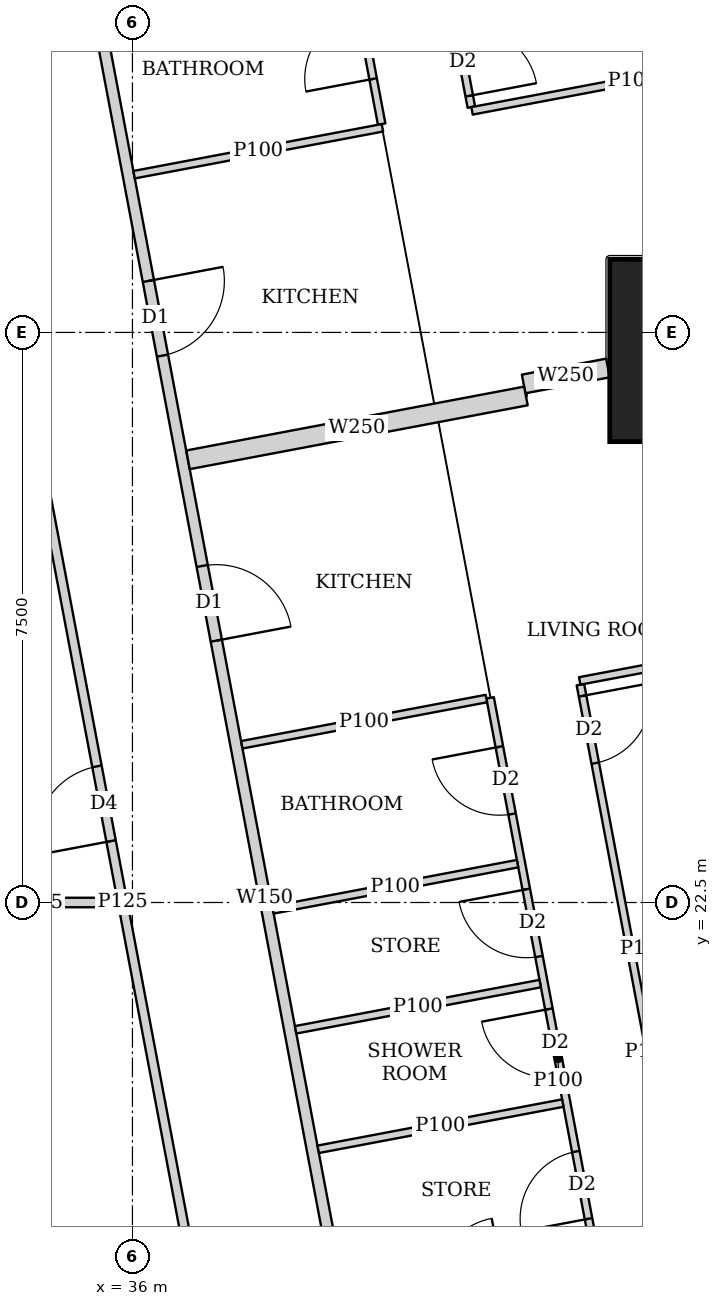
"""IFC4 building model, lengths in metres.
Left out: names, types, materials, properties, quantities, classifications, styles, units other than length and angle.
Written with IfcOpenShell. Run it as: python <this file> out.ifc"""

import sys

from ifc_helpers import new_model, si_unit, direction, frame, frame_2d, origin, origin_2d, place, context, subcontext, project, spatial, rectangle, extrude, element, fill, save


model = new_model("IFC4")
c1 = context("Model", 3, precision=1e-05, world=origin(), true_north=direction((0.0, 1.0)))
c2 = subcontext(c1, "Body", "Model", "MODEL_VIEW")
j1 = project(units=[si_unit("LENGTHUNIT", "METRE"), si_unit("PLANEANGLEUNIT", "RADIAN")], contexts=[c1])
p1 = place(None, origin())
s1 = spatial("IfcSite", under=j1, at=p1, CompositionType="ELEMENT")
p2 = place(p1, origin())
s2 = spatial("IfcBuilding", under=s1, at=p2, CompositionType="ELEMENT")
p3 = place(p2, frame((0.0, 0.0, 242.45)))
s3 = spatial("IfcBuildingStorey", under=s2, at=p3, CompositionType="ELEMENT", Elevation=242.45)
p4 = place(p3, frame((43.48, 29.763, 0.0), z_axis=(0.0, 0.0, 1.0), x_axis=(1.0, 0.0, 0.0)))
e1 = element("IfcColumn", 1, at=p4, inside=s3, PredefinedType="COLUMN", context=c2, shape_type="SweptSolid", body=[
    extrude(rectangle(XDim=2.4, YDim=2.4, at=origin_2d()), origin(), (0.0, 0.0, 1.0), 3.75),
])
p5 = place(p3, frame((33.933, 42.73, 0.0), z_axis=(0.0, 0.0, 1.0), x_axis=(0.185595417643, -0.982626246825, 0.0)))
e2 = element("IfcWall", 2, at=p5, inside=s3, PredefinedType="SOLIDWALL", context=c2, shape_type="SweptSolid", body=[
    extrude(rectangle(XDim=41.051, YDim=0.15, at=frame_2d((20.525, 0.0))), origin(), (0.0, 0.0, 1.0), 2.45),
])
p6 = place(p5, frame((12.266, 0.0, 0.0)))
e3 = element("IfcOpeningElement", 3, at=p6, cuts=e2, PredefinedType="OPENING", context=c2, shape_type="SweptSolid", body=[
    extrude(rectangle(XDim=1.0, YDim=2.1, at=frame_2d((0.5, 1.05))), frame((0.0, 0.085, 0.0), z_axis=(0.0, -1.0, 0.0), x_axis=(1.0, 0.0, 0.0)), (0.0, 0.0, 1.0), 0.17),
])
p7 = place(p5, frame((16.082, 0.0, 0.0)))
e4 = element("IfcOpeningElement", 4, at=p7, cuts=e2, PredefinedType="OPENING", context=c2, shape_type="SweptSolid", body=[
    extrude(rectangle(XDim=1.0, YDim=2.1, at=frame_2d((0.5, 1.05))), frame((0.0, 0.085, 0.0), z_axis=(0.0, -1.0, 0.0), x_axis=(1.0, 0.0, 0.0)), (0.0, 0.0, 1.0), 0.17),
])
p8 = place(p5, frame((30.862, 0.0, 0.0)))
e5 = element("IfcOpeningElement", 5, at=p8, cuts=e2, PredefinedType="OPENING", context=c2, shape_type="SweptSolid", body=[
    extrude(rectangle(XDim=1.0, YDim=2.1, at=frame_2d((0.5, 1.05))), frame((0.0, 0.085, 0.0), z_axis=(0.0, -1.0, 0.0), x_axis=(1.0, 0.0, 0.0)), (0.0, 0.0, 1.0), 0.17),
])
p9 = place(p3, frame((38.764, 41.941, 0.0), z_axis=(0.0, 0.0, 1.0), x_axis=(0.185548572312, -0.982635093671, 0.0)))
e6 = element("IfcWall", 6, at=p9, inside=s3, PredefinedType="PARTITIONING", context=c2, shape_type="SweptSolid", body=[
    extrude(rectangle(XDim=9.135, YDim=0.1, at=frame_2d((4.568, 0.0))), origin(), (0.0, 0.0, 1.0), 3.45),
])
p10 = place(p9, frame((8.085, 0.0, 0.0)))
e7 = element("IfcOpeningElement", 7, at=p10, cuts=e6, PredefinedType="OPENING", context=c2, shape_type="SweptSolid", body=[
    extrude(rectangle(XDim=0.9, YDim=2.1, at=frame_2d((0.45, 1.05))), frame((0.0, 0.06, 0.0), z_axis=(0.0, -1.0, 0.0), x_axis=(1.0, 0.0, 0.0)), (0.0, 0.0, 1.0), 0.12),
])
p11 = place(p9, frame((3.7, 0.0, 0.0)))
e8 = element("IfcOpeningElement", 8, at=p11, cuts=e6, PredefinedType="OPENING", context=c2, shape_type="SweptSolid", body=[
    extrude(rectangle(XDim=0.9, YDim=2.1, at=frame_2d((0.45, 1.05))), frame((0.0, 0.06, 0.0), z_axis=(0.0, -1.0, 0.0), x_axis=(1.0, 0.0, 0.0)), (0.0, 0.0, 1.0), 0.12),
])
p12 = place(p3, frame((37.473, 42.309, 0.0), z_axis=(0.0, 0.0, 1.0), x_axis=(0.185491912953, -0.982645790827, 0.0)))
e9 = element("IfcWall", 9, at=p12, inside=s3, PredefinedType="PARTITIONING", context=c2, shape_type="SweptSolid", body=[
    extrude(rectangle(XDim=9.737, YDim=0.1, at=frame_2d((4.869, 0.0))), origin(), (0.0, 0.0, 1.0), 3.45),
])
p13 = place(p12, frame((8.232, 0.0, 0.0)))
e10 = element("IfcOpeningElement", 10, at=p13, cuts=e9, PredefinedType="OPENING", context=c2, shape_type="SweptSolid", body=[
    extrude(rectangle(XDim=0.9, YDim=2.1, at=frame_2d((0.45, 1.05))), frame((0.0, 0.06, 0.0), z_axis=(0.0, -1.0, 0.0), x_axis=(1.0, 0.0, 0.0)), (0.0, 0.0, 1.0), 0.12),
])
p14 = place(p12, frame((2.853, 0.0, 0.0)))
e11 = element("IfcOpeningElement", 11, at=p14, cuts=e9, PredefinedType="OPENING", context=c2, shape_type="SweptSolid", body=[
    extrude(rectangle(XDim=0.9, YDim=2.1, at=frame_2d((0.45, 1.05))), frame((0.0, 0.06, 0.0), z_axis=(0.0, -1.0, 0.0), x_axis=(1.0, 0.0, 0.0)), (0.0, 0.0, 1.0), 0.12),
])
p15 = place(p12, frame((5.564, 0.0, 0.0)))
e12 = element("IfcOpeningElement", 12, at=p15, cuts=e9, PredefinedType="OPENING", context=c2, shape_type="SweptSolid", body=[
    extrude(rectangle(XDim=0.9, YDim=2.1, at=frame_2d((0.45, 1.05))), frame((0.0, 0.06, 0.0), z_axis=(0.0, -1.0, 0.0), x_axis=(1.0, 0.0, 0.0)), (0.0, 0.0, 1.0), 0.12),
])
p16 = place(p3, frame((44.693, 33.713, 0.0), z_axis=(0.0, 0.0, 1.0), x_axis=(-0.982633535512, -0.185556823879, 0.0)))
e13 = element("IfcWall", 13, at=p16, inside=s3, PredefinedType="PARTITIONING", context=c2, shape_type="SweptSolid", body=[
    extrude(rectangle(XDim=4.3, YDim=0.1, at=frame_2d((2.15, 0.0))), origin(), (0.0, 0.0, 1.0), 2.0),
])
p17 = place(p3, frame((39.289, 32.692, 0.0), z_axis=(0.0, 0.0, 1.0), x_axis=(-0.982633623707, -0.185556356831, 0.0)))
e14 = element("IfcWall", 14, at=p17, inside=s3, PredefinedType="PARTITIONING", context=c2, shape_type="SweptSolid", body=[
    extrude(rectangle(XDim=3.325, YDim=0.1, at=frame_2d((1.663, 0.0))), origin(), (0.0, 0.0, 1.0), 3.45),
])
p18 = place(p3, frame((41.894, 25.366, 0.0), z_axis=(0.0, 0.0, 1.0), x_axis=(0.185612905165, -0.982622943675, 0.0)))
e15 = element("IfcWall", 15, at=p18, inside=s3, PredefinedType="PARTITIONING", context=c2, shape_type="SweptSolid", body=[
    extrude(rectangle(XDim=9.827, YDim=0.1, at=frame_2d((4.913, 0.0))), origin(), (0.0, 0.0, 1.0), 2.45),
])
p19 = place(p18, frame((0.151, 0.0, 0.0)))
e16 = element("IfcOpeningElement", 16, at=p19, cuts=e15, PredefinedType="OPENING", context=c2, shape_type="SweptSolid", body=[
    extrude(rectangle(XDim=0.9, YDim=2.1, at=frame_2d((0.45, 1.05))), frame((0.0, 0.06, 0.0), z_axis=(0.0, -1.0, 0.0), x_axis=(1.0, 0.0, 0.0)), (0.0, 0.0, 1.0), 0.12),
])
p20 = place(p18, frame((5.05, 0.0, 0.0)))
e17 = element("IfcOpeningElement", 17, at=p20, cuts=e15, PredefinedType="OPENING", context=c2, shape_type="SweptSolid", body=[
    extrude(rectangle(XDim=0.9, YDim=2.1, at=frame_2d((0.45, 1.05))), frame((0.0, 0.06, 0.0), z_axis=(0.0, -1.0, 0.0), x_axis=(1.0, 0.0, 0.0)), (0.0, 0.0, 1.0), 0.12),
])
p21 = place(p18, frame((7.783, 0.0, 0.0)))
e18 = element("IfcOpeningElement", 18, at=p21, cuts=e15, PredefinedType="OPENING", context=c2, shape_type="SweptSolid", body=[
    extrude(rectangle(XDim=0.9, YDim=2.1, at=frame_2d((0.45, 1.05))), frame((0.0, 0.06, 0.0), z_axis=(0.0, -1.0, 0.0), x_axis=(1.0, 0.0, 0.0)), (0.0, 0.0, 1.0), 0.12),
])
p22 = place(p3, frame((40.706, 25.192, 0.0), z_axis=(0.0, 0.0, 1.0), x_axis=(0.185629824463, -0.982619747547, 0.0)))
e19 = element("IfcWall", 19, at=p22, inside=s3, PredefinedType="PARTITIONING", context=c2, shape_type="SweptSolid", body=[
    extrude(rectangle(XDim=9.659, YDim=0.1, at=frame_2d((4.83, 0.0))), origin(), (0.0, 0.0, 1.0), 2.45),
])
p23 = place(p22, frame((0.655, 0.0, 0.0)))
e20 = element("IfcOpeningElement", 20, at=p23, cuts=e19, PredefinedType="OPENING", context=c2, shape_type="SweptSolid", body=[
    extrude(rectangle(XDim=0.9, YDim=2.1, at=frame_2d((0.45, 1.05))), frame((0.0, 0.06, 0.0), z_axis=(0.0, -1.0, 0.0), x_axis=(1.0, 0.0, 0.0)), (0.0, 0.0, 1.0), 0.12),
])
p24 = place(p22, frame((4.166, 0.0, 0.0)))
e21 = element("IfcOpeningElement", 21, at=p24, cuts=e19, PredefinedType="OPENING", context=c2, shape_type="SweptSolid", body=[
    extrude(rectangle(XDim=0.9, YDim=2.1, at=frame_2d((0.45, 1.05))), frame((0.0, 0.06, 0.0), z_axis=(0.0, -1.0, 0.0), x_axis=(1.0, 0.0, 0.0)), (0.0, 0.0, 1.0), 0.12),
])
p25 = place(p22, frame((2.563, 0.0, 0.0)))
e22 = element("IfcOpeningElement", 22, at=p25, cuts=e19, PredefinedType="OPENING", context=c2, shape_type="SweptSolid", body=[
    extrude(rectangle(XDim=0.9, YDim=2.1, at=frame_2d((0.45, 1.05))), frame((0.0, 0.06, 0.0), z_axis=(0.0, -1.0, 0.0), x_axis=(1.0, 0.0, 0.0)), (0.0, 0.0, 1.0), 0.12),
])
p26 = place(p22, frame((6.074, 0.0, 0.0)))
e23 = element("IfcOpeningElement", 23, at=p26, cuts=e19, PredefinedType="OPENING", context=c2, shape_type="SweptSolid", body=[
    extrude(rectangle(XDim=0.9, YDim=2.1, at=frame_2d((0.45, 1.05))), frame((0.0, 0.06, 0.0), z_axis=(0.0, -1.0, 0.0), x_axis=(1.0, 0.0, 0.0)), (0.0, 0.0, 1.0), 0.12),
])
p27 = place(p3, frame((46.11, 26.213, 0.0), z_axis=(0.0, 0.0, 1.0), x_axis=(-0.982633535512, -0.185556823879, 0.0)))
e24 = element("IfcWall", 24, at=p27, inside=s3, PredefinedType="PARTITIONING", context=c2, shape_type="SweptSolid", body=[
    extrude(rectangle(XDim=4.3, YDim=0.1, at=frame_2d((2.15, 0.0))), origin(), (0.0, 0.0, 1.0), 2.0),
])
p28 = place(p3, frame((42.887, 21.921, 0.0), z_axis=(0.0, 0.0, 1.0), x_axis=(-0.982688058078, -0.185267861514, 0.0)))
e25 = element("IfcWall", 25, at=p28, inside=s3, PredefinedType="PARTITIONING", context=c2, shape_type="SweptSolid", body=[
    extrude(rectangle(XDim=0.286, YDim=0.1, at=frame_2d((0.143, 0.0))), origin(), (0.0, 0.0, 1.0), 2.45),
])
for number, where, z_axis, x_axis in (
    (26, (40.657, 25.183, 0.0), (0.0, 0.0, 1.0), (-0.983, -0.186, 0.0)),
    (27, (41.365, 21.433, 0.0), (0.0, 0.0, 1.0), (-0.983, -0.186, 0.0)),
):
    element("IfcWall", number, at=place(p3, frame(where, z_axis=z_axis, x_axis=x_axis)), inside=s3, PredefinedType="PARTITIONING", context=c2, shape_type="SweptSolid", body=[
        extrude(rectangle(XDim=3.275, YDim=0.1, at=frame_2d((1.637, 0.0))), origin(), (0.0, 0.0, 1.0), 3.45),
    ])
p29 = place(p3, frame((41.067, 23.011, 0.0), z_axis=(0.0, 0.0, 1.0), x_axis=(-0.982618057925, -0.185638768151, 0.0)))
e28 = element("IfcWall", 28, at=p29, inside=s3, PredefinedType="PARTITIONING", context=c2, shape_type="SweptSolid", body=[
    extrude(rectangle(XDim=3.275, YDim=0.1, at=frame_2d((1.637, 0.0))), origin(), (0.0, 0.0, 1.0), 2.45),
])
p30 = place(p3, frame((41.662, 19.861, 0.0), z_axis=(0.0, 0.0, 1.0), x_axis=(-0.982607026909, -0.185697147715, 0.0)))
e29 = element("IfcWall", 29, at=p30, inside=s3, PredefinedType="PARTITIONING", context=c2, shape_type="SweptSolid", body=[
    extrude(rectangle(XDim=3.275, YDim=0.1, at=frame_2d((1.637, 0.0))), origin(), (0.0, 0.0, 1.0), 3.45),
])
p31 = place(p3, frame((42.256, 29.532, 0.0), z_axis=(0.0, 0.0, 1.0), x_axis=(-0.982549954272, -0.185998890749, 0.0)))
e30 = element("IfcWall", 30, at=p31, inside=s3, PredefinedType="SOLIDWALL", context=c2, shape_type="SweptSolid", body=[
    extrude(rectangle(XDim=1.129, YDim=0.25, at=frame_2d((0.564, 0.0))), origin(), (0.0, 0.0, 1.0), 2.0),
])
p32 = place(p3, frame((41.177, 29.164, 0.0), z_axis=(0.0, 0.0, 1.0), x_axis=(-0.982612837616, -0.185666398014, 0.0)))
e31 = element("IfcWall", 31, at=p32, inside=s3, PredefinedType="SOLIDWALL", context=c2, shape_type="SweptSolid", body=[
    extrude(rectangle(XDim=4.525, YDim=0.25, at=frame_2d((2.262, 0.0))), origin(), (0.0, 0.0, 1.0), 2.45),
])
p33 = place(p3, frame((38.202, 10.163, 0.0), z_axis=(0.0, 0.0, 1.0), x_axis=(-0.185610321132, 0.982623431783, 0.0)))
e32 = element("IfcWall", 32, at=p33, inside=s3, PredefinedType="PARTITIONING", context=c2, shape_type="SweptSolid", body=[
    extrude(rectangle(XDim=25.111, YDim=0.125, at=frame_2d((12.556, 0.0))), origin(), (0.0, 0.0, 1.0), 2.45),
])
p34 = place(p33, frame((0.708, 0.0, 0.0)))
e33 = element("IfcOpeningElement", 33, at=p34, cuts=e32, PredefinedType="OPENING", context=c2, shape_type="SweptSolid", body=[
    extrude(rectangle(XDim=1.0, YDim=2.1, at=frame_2d((0.5, 1.05))), frame((0.0, 0.073, 0.0), z_axis=(0.0, -1.0, 0.0), x_axis=(1.0, 0.0, 0.0)), (0.0, 0.0, 1.0), 0.145),
])
p35 = place(p33, frame((13.378, 0.0, 0.0)))
e34 = element("IfcOpeningElement", 34, at=p35, cuts=e32, PredefinedType="OPENING", context=c2, shape_type="SweptSolid", body=[
    extrude(rectangle(XDim=1.0, YDim=2.1, at=frame_2d((0.5, 1.05))), frame((0.0, 0.073, 0.0), z_axis=(0.0, -1.0, 0.0), x_axis=(1.0, 0.0, 0.0)), (0.0, 0.0, 1.0), 0.145),
])
p36 = place(p33, frame((21.15, 0.0, 0.0)))
e35 = element("IfcOpeningElement", 35, at=p36, cuts=e32, PredefinedType="OPENING", context=c2, shape_type="SweptSolid", body=[
    extrude(rectangle(XDim=1.0, YDim=2.1, at=frame_2d((0.5, 1.05))), frame((0.0, 0.073, 0.0), z_axis=(0.0, -1.0, 0.0), x_axis=(1.0, 0.0, 0.0)), (0.0, 0.0, 1.0), 0.145),
])
p37 = place(p33, frame((23.453, 0.0, 0.0)))
e36 = element("IfcOpeningElement", 36, at=p37, cuts=e32, PredefinedType="OPENING", context=c2, shape_type="SweptSolid", body=[
    extrude(rectangle(XDim=1.0, YDim=2.1, at=frame_2d((0.5, 1.05))), frame((0.0, 0.073, 0.0), z_axis=(0.0, -1.0, 0.0), x_axis=(1.0, 0.0, 0.0)), (0.0, 0.0, 1.0), 0.145),
])
p38 = place(p3, frame((33.701, 22.5, 0.0), z_axis=(0.0, 0.0, 1.0), x_axis=(1.0, 0.0, 0.0)))
e37 = element("IfcWall", 37, at=p38, inside=s3, PredefinedType="PARTITIONING", context=c2, shape_type="SweptSolid", body=[
    extrude(rectangle(XDim=2.095, YDim=0.125, at=frame_2d((1.047, 0.0))), origin(), (0.0, 0.0, 1.0), 2.45),
])
p39 = place(p10, origin())
e38 = element("IfcDoor", 38, at=p39, inside=s3, OperationType="SINGLE_SWING_RIGHT", PredefinedType="DOOR", context=c2, shape_type="SweptSolid", body=[
    extrude(rectangle(XDim=0.9, YDim=2.1, at=frame_2d((0.45, 1.05))), frame((0.0, 0.025, 0.0), z_axis=(0.0, -1.0, 0.0), x_axis=(1.0, 0.0, 0.0)), (0.0, 0.0, 1.0), 0.05),
])
fill(e7, e38)
p40 = place(p13, origin())
e39 = element("IfcDoor", 39, at=p40, inside=s3, OperationType="SINGLE_SWING_LEFT", PredefinedType="DOOR", context=c2, shape_type="SweptSolid", body=[
    extrude(rectangle(XDim=0.9, YDim=2.1, at=frame_2d((0.45, 1.05))), frame((0.0, 0.025, 0.0), z_axis=(0.0, -1.0, 0.0), x_axis=(1.0, 0.0, 0.0)), (0.0, 0.0, 1.0), 0.05),
])
fill(e10, e39)
p41 = place(p6, origin())
e40 = element("IfcDoor", 40, at=p41, inside=s3, OperationType="SINGLE_SWING_LEFT", PredefinedType="DOOR", context=c2, shape_type="SweptSolid", body=[
    extrude(rectangle(XDim=1.0, YDim=2.1, at=frame_2d((0.5, 1.05))), frame((0.0, 0.025, 0.0), z_axis=(0.0, -1.0, 0.0), x_axis=(1.0, 0.0, 0.0)), (0.0, 0.0, 1.0), 0.05),
])
fill(e3, e40)
p42 = place(p19, origin())
e41 = element("IfcDoor", 41, at=p42, inside=s3, OperationType="SINGLE_SWING_LEFT", PredefinedType="DOOR", context=c2, shape_type="SweptSolid", body=[
    extrude(rectangle(XDim=0.9, YDim=2.1, at=frame_2d((0.45, 1.05))), frame((0.0, 0.025, 0.0), z_axis=(0.0, -1.0, 0.0), x_axis=(1.0, 0.0, 0.0)), (0.0, 0.0, 1.0), 0.05),
])
fill(e16, e41)
p43 = place(p23, origin())
e42 = element("IfcDoor", 42, at=p43, inside=s3, OperationType="SINGLE_SWING_RIGHT", PredefinedType="DOOR", context=c2, shape_type="SweptSolid", body=[
    extrude(rectangle(XDim=0.9, YDim=2.1, at=frame_2d((0.45, 1.05))), frame((0.0, 0.025, 0.0), z_axis=(0.0, -1.0, 0.0), x_axis=(1.0, 0.0, 0.0)), (0.0, 0.0, 1.0), 0.05),
])
fill(e20, e42)
p44 = place(p24, origin())
e43 = element("IfcDoor", 43, at=p44, inside=s3, OperationType="SINGLE_SWING_RIGHT", PredefinedType="DOOR", context=c2, shape_type="SweptSolid", body=[
    extrude(rectangle(XDim=0.9, YDim=2.1, at=frame_2d((0.45, 1.05))), frame((0.0, 0.025, 0.0), z_axis=(0.0, -1.0, 0.0), x_axis=(1.0, 0.0, 0.0)), (0.0, 0.0, 1.0), 0.05),
])
fill(e21, e43)
p45 = place(p25, origin())
e44 = element("IfcDoor", 44, at=p45, inside=s3, OperationType="SINGLE_SWING_RIGHT", PredefinedType="DOOR", context=c2, shape_type="SweptSolid", body=[
    extrude(rectangle(XDim=0.9, YDim=2.1, at=frame_2d((0.45, 1.05))), frame((0.0, 0.025, 0.0), z_axis=(0.0, -1.0, 0.0), x_axis=(1.0, 0.0, 0.0)), (0.0, 0.0, 1.0), 0.05),
])
fill(e22, e44)
p46 = place(p26, origin())
e45 = element("IfcDoor", 45, at=p46, inside=s3, OperationType="SINGLE_SWING_LEFT", PredefinedType="DOOR", context=c2, shape_type="SweptSolid", body=[
    extrude(rectangle(XDim=0.9, YDim=2.1, at=frame_2d((0.45, 1.05))), frame((0.0, 0.025, 0.0), z_axis=(0.0, -1.0, 0.0), x_axis=(1.0, 0.0, 0.0)), (0.0, 0.0, 1.0), 0.05),
])
fill(e23, e45)
p47 = place(p7, origin())
e46 = element("IfcDoor", 46, at=p47, inside=s3, OperationType="SINGLE_SWING_RIGHT", PredefinedType="DOOR", context=c2, shape_type="SweptSolid", body=[
    extrude(rectangle(XDim=1.0, YDim=2.1, at=frame_2d((0.5, 1.05))), frame((0.0, 0.025, 0.0), z_axis=(0.0, -1.0, 0.0), x_axis=(1.0, 0.0, 0.0)), (0.0, 0.0, 1.0), 0.05),
])
fill(e4, e46)
p48 = place(p35, origin())
e47 = element("IfcDoor", 47, at=p48, inside=s3, OperationType="SINGLE_SWING_LEFT", PredefinedType="DOOR", context=c2, shape_type="SweptSolid", body=[
    extrude(rectangle(XDim=1.0, YDim=2.1, at=frame_2d((0.5, 1.05))), frame((0.0, 0.025, 0.0), z_axis=(0.0, -1.0, 0.0), x_axis=(1.0, 0.0, 0.0)), (0.0, 0.0, 1.0), 0.05),
])
fill(e34, e47)
save(model, sys.argv[1])
